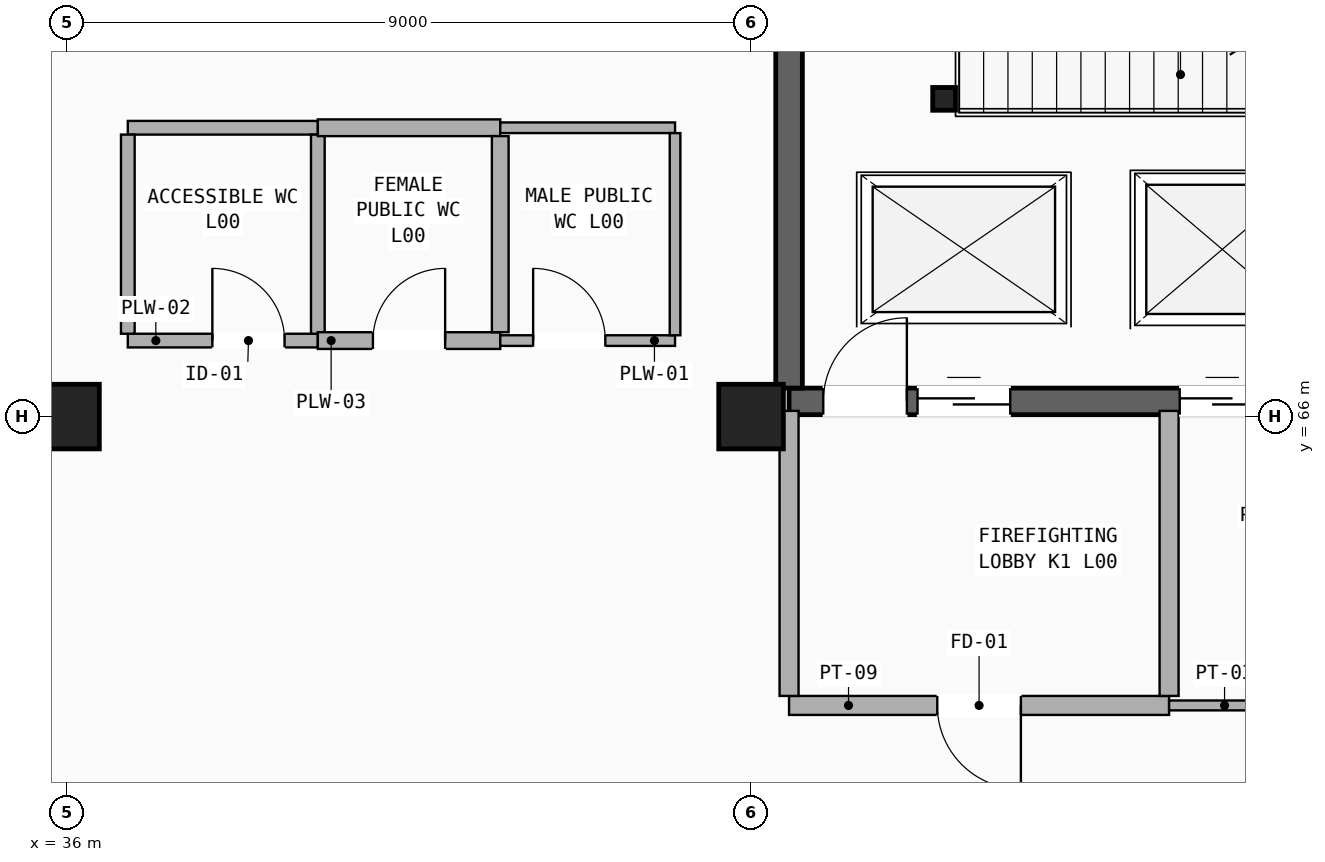
"""IFC4 building model, lengths in metres.
Left out: names, types, materials, properties, quantities, classifications, styles, units other than length and angle.
Written with IfcOpenShell. Run it as: python <this file> out.ifc"""

import sys

from ifc_helpers import new_model, si_unit, direction, frame, frame_2d, origin, origin_2d, place, context, subcontext, project, spatial, rectangle, hollow_rectangle, extrude, element, fill, save


model = new_model("IFC4")
c1 = context("Model", 3, precision=1e-05, world=origin(), true_north=direction((0.0, 1.0)))
c2 = subcontext(c1, "Body", "Model", "MODEL_VIEW")
j1 = project(units=[si_unit("LENGTHUNIT", "METRE"), si_unit("PLANEANGLEUNIT", "RADIAN")], contexts=[c1])
p1 = place(None, origin())
s1 = spatial("IfcSite", under=j1, at=p1, CompositionType="ELEMENT")
p2 = place(p1, origin())
s2 = spatial("IfcBuilding", under=s1, at=p2, CompositionType="ELEMENT")
p3 = place(p2, origin())
s3 = spatial("IfcBuildingStorey", under=s2, at=p3, CompositionType="ELEMENT", Elevation=0.0)
for number, where, z_axis, x_axis in (
    (1, (36.0, 66.0, 0.0), (0.0, 0.0, 1.0), (1.0, 0.0, 0.0)),
    (2, (45.0, 66.0, 0.0), (0.0, 0.0, 1.0), (1.0, 0.0, 0.0)),
):
    element("IfcColumn", number, at=place(p3, frame(where, z_axis=z_axis, x_axis=x_axis)), inside=s3, PredefinedType="COLUMN", context=c2, shape_type="SweptSolid", body=[
        extrude(rectangle(XDim=0.85, YDim=0.85, at=origin_2d()), origin(), (0.0, 0.0, 1.0), 5.1),
    ])
p4 = place(p3, frame((45.5, 66.2, 0.0), z_axis=(0.0, 0.0, 1.0), x_axis=(1.0, 0.0, 0.0)))
e3 = element("IfcWall", 3, at=p4, inside=s3, PredefinedType="SHEAR", context=c2, shape_type="SweptSolid", body=[
    extrude(rectangle(XDim=10.3, YDim=0.35, at=frame_2d((5.15, 0.0))), origin(), (0.0, 0.0, 1.0), 5.1),
])
p5 = place(p4, frame((0.45, 0.0, 0.0)))
e4 = element("IfcOpeningElement", 4, at=p5, cuts=e3, PredefinedType="OPENING", context=c2, shape_type="SweptSolid", body=[
    extrude(rectangle(XDim=1.1, YDim=2.2, at=frame_2d((0.55, 1.1))), frame((0.0, 0.185, 0.0), z_axis=(0.0, -1.0, 0.0), x_axis=(1.0, 0.0, 0.0)), (0.0, 0.0, 1.0), 0.37),
])
p6 = place(p4, frame((1.69, 0.0, 0.0)))
e5 = element("IfcOpeningElement", 5, at=p6, cuts=e3, PredefinedType="OPENING", context=c2, shape_type="SweptSolid", body=[
    extrude(rectangle(XDim=1.22, YDim=2.2, at=frame_2d((0.61, 1.1))), frame((0.0, 0.185, 0.0), z_axis=(0.0, -1.0, 0.0), x_axis=(1.0, 0.0, 0.0)), (0.0, 0.0, 1.0), 0.37),
])
p7 = place(p4, frame((5.14, 0.0, 0.0)))
e6 = element("IfcOpeningElement", 6, at=p7, cuts=e3, PredefinedType="OPENING", context=c2, shape_type="SweptSolid", body=[
    extrude(rectangle(XDim=1.12, YDim=2.16, at=frame_2d((0.56, 1.08))), frame((0.0, 0.185, 0.0), z_axis=(0.0, -1.0, 0.0), x_axis=(1.0, 0.0, 0.0)), (0.0, 0.0, 1.0), 0.37),
])
p8 = place(p3, frame((45.5, 66.375, 0.0), z_axis=(0.0, 0.0, 1.0), x_axis=(0.0, 1.0, 0.0)))
e7 = element("IfcWall", 7, at=p8, inside=s3, PredefinedType="SHEAR", context=c2, shape_type="SweptSolid", body=[
    extrude(rectangle(XDim=8.25, YDim=0.35, at=frame_2d((4.125, 0.0))), origin(), (0.0, 0.0, 1.0), 5.1),
])
p9 = place(p3, frame((47.54, 70.18, 0.0), z_axis=(0.0, 0.0, 1.0), x_axis=(1.0, 0.0, 0.0)))
e8 = element("IfcColumn", 8, at=p9, inside=s3, PredefinedType="COLUMN", context=c2, shape_type="SweptSolid", body=[
    extrude(hollow_rectangle(XDim=0.3, YDim=0.3, WallThickness=0.016, InnerFilletRadius=0.016, OuterFilletRadius=0.032, at=origin_2d()), origin(), (0.0, 0.0, 1.0), 5.1),
])
p10 = place(p3, frame((45.5, 62.2, 0.0), z_axis=(0.0, 0.0, 1.0), x_axis=(1.0, 0.0, 0.0)))
e9 = element("IfcWall", 9, at=p10, inside=s3, PredefinedType="PARTITIONING", context=c2, shape_type="SweptSolid", body=[
    extrude(rectangle(XDim=5.0, YDim=0.25, at=frame_2d((2.5, 0.0))), origin(), (0.0, 0.0, 1.0), 4.85),
])
p11 = place(p10, frame((1.95, 0.0, 0.0)))
e10 = element("IfcOpeningElement", 10, at=p11, cuts=e9, PredefinedType="OPENING", context=c2, shape_type="SweptSolid", body=[
    extrude(rectangle(XDim=1.1, YDim=2.2, at=frame_2d((0.55, 1.1))), frame((0.0, 0.135, 0.0), z_axis=(0.0, -1.0, 0.0), x_axis=(1.0, 0.0, 0.0)), (0.0, 0.0, 1.0), 0.27),
])
for number, where, z_axis, x_axis in (
    (11, (45.5, 62.325, 0.0), (0.0, 0.0, 1.0), (0.0, 1.0, 0.0)),
    (12, (50.5, 62.325, 0.0), (0.0, 0.0, 1.0), (0.0, 1.0, 0.0)),
):
    element("IfcWall", number, at=place(p3, frame(where, z_axis=z_axis, x_axis=x_axis)), inside=s3, PredefinedType="PARTITIONING", context=c2, shape_type="SweptSolid", body=[
        extrude(rectangle(XDim=3.75, YDim=0.25, at=frame_2d((1.875, 0.0))), origin(), (0.0, 0.0, 1.0), 3.93),
    ])
p12 = place(p3, frame((50.5, 62.2, 0.0), z_axis=(0.0, 0.0, 1.0), x_axis=(1.0, 0.0, 0.0)))
e13 = element("IfcWall", 13, at=p12, inside=s3, PredefinedType="PARTITIONING", context=c2, shape_type="SweptSolid", body=[
    extrude(rectangle(XDim=5.3, YDim=0.13, at=frame_2d((2.65, 0.0))), origin(), (0.0, 0.0, 1.0), 3.98),
])
p13 = place(p12, frame((1.95, 0.0, 0.0)))
e14 = element("IfcOpeningElement", 14, at=p13, cuts=e13, PredefinedType="OPENING", context=c2, shape_type="SweptSolid", body=[
    extrude(rectangle(XDim=1.4, YDim=2.2, at=frame_2d((0.7, 1.1))), frame((0.0, 0.075, 0.0), z_axis=(0.0, -1.0, 0.0), x_axis=(1.0, 0.0, 0.0)), (0.0, 0.0, 1.0), 0.15),
])
p14 = place(p3, frame((36.8, 67.0, 0.0), z_axis=(0.0, 0.0, 1.0), x_axis=(1.0, 0.0, 0.0)))
e15 = element("IfcWall", 15, at=p14, inside=s3, PredefinedType="PLUMBINGWALL", context=c2, shape_type="SweptSolid", body=[
    extrude(rectangle(XDim=2.5, YDim=0.18, at=frame_2d((1.25, 0.0))), origin(), (0.0, 0.0, 1.0), 4.85),
])
p15 = place(p14, frame((1.112, 0.0, 0.0)))
e16 = element("IfcOpeningElement", 16, at=p15, cuts=e15, PredefinedType="OPENING", context=c2, shape_type="SweptSolid", body=[
    extrude(rectangle(XDim=0.95, YDim=2.15, at=frame_2d((0.475, 1.075))), frame((0.0, 0.1, 0.0), z_axis=(0.0, -1.0, 0.0), x_axis=(1.0, 0.0, 0.0)), (0.0, 0.0, 1.0), 0.2),
])
p16 = place(p3, frame((36.8, 69.8, 0.0), z_axis=(0.0, 0.0, 1.0), x_axis=(1.0, 0.0, 0.0)))
e17 = element("IfcWall", 17, at=p16, inside=s3, PredefinedType="PLUMBINGWALL", context=c2, shape_type="SweptSolid", body=[
    extrude(rectangle(XDim=2.5, YDim=0.18, at=frame_2d((1.25, 0.0))), origin(), (0.0, 0.0, 1.0), 4.85),
])
for number, where, z_axis, x_axis in (
    (18, (36.8, 67.09, 0.0), (0.0, 0.0, 1.0), (0.0, 1.0, 0.0)),
    (19, (39.3, 67.09, 0.0), (0.0, 0.0, 1.0), (0.0, 1.0, 0.0)),
):
    element("IfcWall", number, at=place(p3, frame(where, z_axis=z_axis, x_axis=x_axis)), inside=s3, PredefinedType="PLUMBINGWALL", context=c2, shape_type="SweptSolid", body=[
        extrude(rectangle(XDim=2.62, YDim=0.18, at=frame_2d((1.31, 0.0))), origin(), (0.0, 0.0, 1.0), 4.85),
    ])
p17 = place(p3, frame((39.3, 67.0, 0.0), z_axis=(0.0, 0.0, 1.0), x_axis=(1.0, 0.0, 0.0)))
e20 = element("IfcWall", 20, at=p17, inside=s3, PredefinedType="PLUMBINGWALL", context=c2, shape_type="SweptSolid", body=[
    extrude(rectangle(XDim=2.4, YDim=0.22, at=frame_2d((1.2, 0.0))), origin(), (0.0, 0.0, 1.0), 4.85),
])
p18 = place(p17, frame((0.725, 0.0, 0.0)))
e21 = element("IfcOpeningElement", 21, at=p18, cuts=e20, PredefinedType="OPENING", context=c2, shape_type="SweptSolid", body=[
    extrude(rectangle(XDim=0.95, YDim=2.15, at=frame_2d((0.475, 1.075))), frame((0.0, 0.12, 0.0), z_axis=(0.0, -1.0, 0.0), x_axis=(1.0, 0.0, 0.0)), (0.0, 0.0, 1.0), 0.24),
])
p19 = place(p3, frame((39.3, 69.8, 0.0), z_axis=(0.0, 0.0, 1.0), x_axis=(1.0, 0.0, 0.0)))
e22 = element("IfcWall", 22, at=p19, inside=s3, PredefinedType="PLUMBINGWALL", context=c2, shape_type="SweptSolid", body=[
    extrude(rectangle(XDim=2.4, YDim=0.22, at=frame_2d((1.2, 0.0))), origin(), (0.0, 0.0, 1.0), 4.85),
])
p20 = place(p3, frame((41.7, 67.11, 0.0), z_axis=(0.0, 0.0, 1.0), x_axis=(0.0, 1.0, 0.0)))
e23 = element("IfcWall", 23, at=p20, inside=s3, PredefinedType="PLUMBINGWALL", context=c2, shape_type="SweptSolid", body=[
    extrude(rectangle(XDim=2.58, YDim=0.22, at=frame_2d((1.29, 0.0))), origin(), (0.0, 0.0, 1.0), 4.85),
])
p21 = place(p3, frame((41.7, 67.0, 0.0), z_axis=(0.0, 0.0, 1.0), x_axis=(1.0, 0.0, 0.0)))
e24 = element("IfcWall", 24, at=p21, inside=s3, PredefinedType="PLUMBINGWALL", context=c2, shape_type="SweptSolid", body=[
    extrude(rectangle(XDim=2.3, YDim=0.14, at=frame_2d((1.15, 0.0))), origin(), (0.0, 0.0, 1.0), 4.85),
])
p22 = place(p21, frame((0.433, 0.0, 0.0)))
e25 = element("IfcOpeningElement", 25, at=p22, cuts=e24, PredefinedType="OPENING", context=c2, shape_type="SweptSolid", body=[
    extrude(rectangle(XDim=0.95, YDim=2.15, at=frame_2d((0.475, 1.075))), frame((0.0, 0.08, 0.0), z_axis=(0.0, -1.0, 0.0), x_axis=(1.0, 0.0, 0.0)), (0.0, 0.0, 1.0), 0.16),
])
p23 = place(p3, frame((41.7, 69.8, 0.0), z_axis=(0.0, 0.0, 1.0), x_axis=(1.0, 0.0, 0.0)))
e26 = element("IfcWall", 26, at=p23, inside=s3, PredefinedType="PLUMBINGWALL", context=c2, shape_type="SweptSolid", body=[
    extrude(rectangle(XDim=2.3, YDim=0.14, at=frame_2d((1.15, 0.0))), origin(), (0.0, 0.0, 1.0), 4.85),
])
p24 = place(p3, frame((44.0, 67.07, 0.0), z_axis=(0.0, 0.0, 1.0), x_axis=(0.0, 1.0, 0.0)))
e27 = element("IfcWall", 27, at=p24, inside=s3, PredefinedType="PLUMBINGWALL", context=c2, shape_type="SweptSolid", body=[
    extrude(rectangle(XDim=2.66, YDim=0.14, at=frame_2d((1.33, 0.0))), origin(), (0.0, 0.0, 1.0), 4.85),
])
p25 = place(p5, origin())
e28 = element("IfcDoor", 28, at=p25, inside=s3, OperationType="SINGLE_SWING_RIGHT", PredefinedType="DOOR", context=c2, shape_type="SweptSolid", body=[
    extrude(rectangle(XDim=1.1, YDim=2.2, at=frame_2d((0.55, 1.1))), frame((0.0, 0.025, 0.0), z_axis=(0.0, -1.0, 0.0), x_axis=(1.0, 0.0, 0.0)), (0.0, 0.0, 1.0), 0.05),
])
fill(e4, e28)
p26 = place(p6, origin())
e29 = element("IfcDoor", 29, at=p26, inside=s3, OperationType="SLIDING_TO_LEFT", PredefinedType="DOOR", context=c2, shape_type="SweptSolid", body=[
    extrude(rectangle(XDim=1.22, YDim=2.2, at=frame_2d((0.61, 1.1))), frame((0.0, 0.025, 0.0), z_axis=(0.0, -1.0, 0.0), x_axis=(1.0, 0.0, 0.0)), (0.0, 0.0, 1.0), 0.05),
])
fill(e5, e29)
p27 = place(p7, origin())
e30 = element("IfcDoor", 30, at=p27, inside=s3, OperationType="SLIDING_TO_LEFT", PredefinedType="DOOR", context=c2, shape_type="SweptSolid", body=[
    extrude(rectangle(XDim=1.12, YDim=2.16, at=frame_2d((0.56, 1.08))), frame((0.0, 0.025, 0.0), z_axis=(0.0, -1.0, 0.0), x_axis=(1.0, 0.0, 0.0)), (0.0, 0.0, 1.0), 0.05),
])
fill(e6, e30)
p28 = place(p11, frame((1.1, 0.0, 0.0), z_axis=(0.0, 0.0, 1.0), x_axis=(-1.0, 0.0, 0.0)))
e31 = element("IfcDoor", 31, at=p28, inside=s3, OperationType="SINGLE_SWING_LEFT", PredefinedType="DOOR", context=c2, shape_type="SweptSolid", body=[
    extrude(rectangle(XDim=1.1, YDim=2.2, at=frame_2d((0.55, 1.1))), frame((0.0, 0.025, 0.0), z_axis=(0.0, -1.0, 0.0), x_axis=(1.0, 0.0, 0.0)), (0.0, 0.0, 1.0), 0.05),
])
fill(e10, e31)
p29 = place(p15, origin())
e32 = element("IfcDoor", 32, at=p29, inside=s3, OperationType="SINGLE_SWING_LEFT", PredefinedType="DOOR", context=c2, shape_type="SweptSolid", body=[
    extrude(rectangle(XDim=0.95, YDim=2.15, at=frame_2d((0.475, 1.075))), frame((0.0, 0.025, 0.0), z_axis=(0.0, -1.0, 0.0), x_axis=(1.0, 0.0, 0.0)), (0.0, 0.0, 1.0), 0.05),
])
fill(e16, e32)
p30 = place(p18, origin())
e33 = element("IfcDoor", 33, at=p30, inside=s3, OperationType="SINGLE_SWING_RIGHT", PredefinedType="DOOR", context=c2, shape_type="SweptSolid", body=[
    extrude(rectangle(XDim=0.95, YDim=2.15, at=frame_2d((0.475, 1.075))), frame((0.0, 0.025, 0.0), z_axis=(0.0, -1.0, 0.0), x_axis=(1.0, 0.0, 0.0)), (0.0, 0.0, 1.0), 0.05),
])
fill(e21, e33)
p31 = place(p22, origin())
e34 = element("IfcDoor", 34, at=p31, inside=s3, OperationType="SINGLE_SWING_LEFT", PredefinedType="DOOR", context=c2, shape_type="SweptSolid", body=[
    extrude(rectangle(XDim=0.95, YDim=2.15, at=frame_2d((0.475, 1.075))), frame((0.0, 0.025, 0.0), z_axis=(0.0, -1.0, 0.0), x_axis=(1.0, 0.0, 0.0)), (0.0, 0.0, 1.0), 0.05),
])
fill(e25, e34)
save(model, sys.argv[1])
